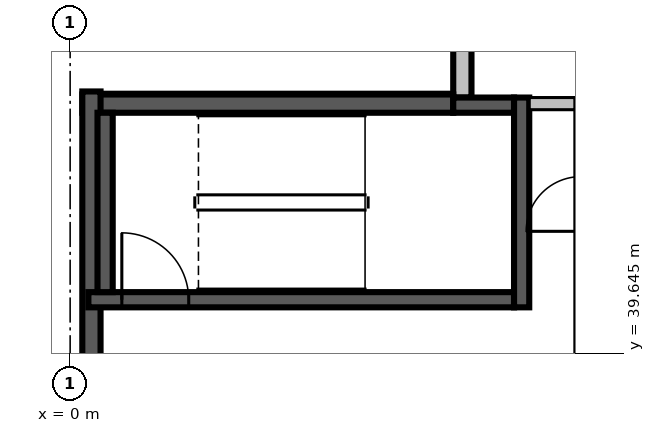
"""IFC4 building model, lengths in metres.
Left out: names, types, materials, properties, quantities, classifications, styles, units other than length and angle.
Written with IfcOpenShell. Run it as: python <this file> out.ifc"""

import sys

from ifc_helpers import new_model, si_unit, direction, frame, frame_2d, origin, place, context, subcontext, project, spatial, rectangle, extrude, source, transform, mapped, element, fill, save


model = new_model("IFC4")
c1 = context("Model", 3, precision=1e-05, world=origin(), true_north=direction((0.0, 1.0)))
c2 = subcontext(c1, "Body", "Model", "MODEL_VIEW")
j1 = project(units=[si_unit("LENGTHUNIT", "METRE"), si_unit("PLANEANGLEUNIT", "RADIAN")], contexts=[c1])
p1 = place(None, origin())
s1 = spatial("IfcSite", under=j1, at=p1, CompositionType="ELEMENT")
p2 = place(p1, origin())
s2 = spatial("IfcBuilding", under=s1, at=p2, CompositionType="ELEMENT")
p3 = place(p2, frame((0.0, 0.0, 153.9)))
s3 = spatial("IfcBuildingStorey", under=s2, at=p3, CompositionType="ELEMENT", Elevation=153.9)
m1 = source(origin(), c2, "Body", "SweptSolid", [
    extrude(rectangle(XDim=9.91, YDim=0.3, at=frame_2d((4.955, 0.0))), origin(), (0.0, 0.0, 1.0), 3.8),
])
p4 = place(p3, frame((6.45, 53.76, 0.0), z_axis=(0.0, 0.0, 1.0), x_axis=(0.0, -1.0, 0.0)))
e1 = element("IfcWall", 1, at=p4, inside=s3, PredefinedType="STANDARD", context=c2, shape_type="MappedRepresentation", body=[
    mapped(m1, transform((0.0, 0.0, 0.0), scale=1.0)),
])
m2 = source(origin(), c2, "Body", "SweptSolid", [
    extrude(rectangle(XDim=3.6, YDim=2.7, at=frame_2d((1.8, 1.35))), frame((0.0, 0.16, 0.0), z_axis=(0.0, -1.0, 0.0), x_axis=(1.0, 0.0, 0.0)), (0.0, 0.0, 1.0), 0.32),
])
p5 = place(p4, frame((3.39, 0.0, 0.6)))
e2 = element("IfcOpeningElement", 2, at=p5, cuts=e1, PredefinedType="OPENING", context=c2, shape_type="MappedRepresentation", body=[
    mapped(m2, transform((0.0, 0.0, 0.0), scale=1.0)),
])
m3 = source(origin(), c2, "Body", "SweptSolid", [
    extrude(rectangle(XDim=2.4, YDim=2.7, at=frame_2d((1.2, 1.35))), frame((0.0, 0.16, 0.0), z_axis=(0.0, -1.0, 0.0), x_axis=(1.0, 0.0, 0.0)), (0.0, 0.0, 1.0), 0.32),
])
p6 = place(p4, frame((0.495, 0.0, 0.6)))
e3 = element("IfcOpeningElement", 3, at=p6, cuts=e1, PredefinedType="OPENING", context=c2, shape_type="MappedRepresentation", body=[
    mapped(m3, transform((0.0, 0.0, 0.0), scale=1.0)),
])
m4 = source(origin(), c2, "Body", "SweptSolid", [
    extrude(rectangle(XDim=6.1, YDim=0.3, at=frame_2d((3.05, 0.0))), origin(), (0.0, 0.0, 1.0), 3.8),
])
p7 = place(p3, frame((6.3, 43.75, 0.0), z_axis=(0.0, 0.0, 1.0), x_axis=(-1.0, 0.0, 0.0)))
e4 = element("IfcWall", 4, at=p7, inside=s3, PredefinedType="SOLIDWALL", context=c2, shape_type="MappedRepresentation", body=[
    mapped(m4, transform((0.0, 0.0, 0.0), scale=1.0)),
])
m5 = source(origin(), c2, "Body", "SweptSolid", [
    extrude(rectangle(XDim=5.65, YDim=0.3, at=frame_2d((2.825, 0.0))), origin(), (0.0, 0.0, 1.0), 3.8),
])
p8 = place(p3, frame((0.35, 43.95, 0.0), z_axis=(0.0, 0.0, 1.0), x_axis=(0.0, -1.0, 0.0)))
e5 = element("IfcWall", 5, at=p8, inside=s3, PredefinedType="SOLIDWALL", context=c2, shape_type="MappedRepresentation", body=[
    mapped(m5, transform((0.0, 0.0, 0.0), scale=1.0)),
])
m6 = source(origin(), c2, "Body", "SweptSolid", [
    extrude(rectangle(XDim=7.0, YDim=0.25, at=frame_2d((3.5, 0.0))), origin(), (0.0, 0.0, 1.0), 3.8),
])
p9 = place(p3, frame((0.3, 40.525, 0.0), z_axis=(0.0, 0.0, 1.0), x_axis=(1.0, 0.0, 0.0)))
e6 = element("IfcWall", 6, at=p9, inside=s3, PredefinedType="SOLIDWALL", context=c2, shape_type="MappedRepresentation", body=[
    mapped(m6, transform((0.0, 0.0, 0.0), scale=1.0)),
])
m7 = source(origin(), c2, "Body", "SweptSolid", [
    extrude(rectangle(XDim=1.1, YDim=2.1, at=frame_2d((0.55, 1.05))), frame((0.0, 0.135, 0.0), z_axis=(0.0, -1.0, 0.0), x_axis=(1.0, 0.0, 0.0)), (0.0, 0.0, 1.0), 0.27),
])
p10 = place(p9, frame((0.55, 0.0, 0.0)))
e7 = element("IfcOpeningElement", 7, at=p10, cuts=e6, PredefinedType="OPENING", context=c2, shape_type="MappedRepresentation", body=[
    mapped(m7, transform((0.0, 0.0, 0.0), scale=1.0)),
])
m8 = source(origin(), c2, "Body", "SweptSolid", [
    extrude(rectangle(XDim=1.0, YDim=0.25, at=frame_2d((0.5, 0.0))), origin(), (0.0, 0.0, 1.0), 3.8),
])
p11 = place(p3, frame((6.3, 43.725, 0.0), z_axis=(0.0, 0.0, 1.0), x_axis=(1.0, 0.0, 0.0)))
e8 = element("IfcWall", 8, at=p11, inside=s3, PredefinedType="SOLIDWALL", context=c2, shape_type="MappedRepresentation", body=[
    mapped(m8, transform((0.0, 0.0, 0.0), scale=1.0)),
])
m9 = source(origin(), c2, "Body", "SweptSolid", [
    extrude(rectangle(XDim=3.45, YDim=0.25, at=frame_2d((1.725, 0.0))), origin(), (0.0, 0.0, 1.0), 3.8),
])
p12 = place(p3, frame((7.425, 40.4, 0.0), z_axis=(0.0, 0.0, 1.0), x_axis=(0.0, 1.0, 0.0)))
e9 = element("IfcWall", 9, at=p12, inside=s3, PredefinedType="SOLIDWALL", context=c2, shape_type="MappedRepresentation", body=[
    mapped(m9, transform((0.0, 0.0, 0.0), scale=1.0)),
])
m10 = source(origin(), c2, "Body", "SweptSolid", [
    extrude(rectangle(XDim=2.95, YDim=0.25, at=frame_2d((1.475, 0.0))), origin(), (0.0, 0.0, 1.0), 3.8),
])
p13 = place(p3, frame((0.575, 40.65, 0.0), z_axis=(0.0, 0.0, 1.0), x_axis=(0.0, 1.0, 0.0)))
e10 = element("IfcWall", 10, at=p13, inside=s3, PredefinedType="SOLIDWALL", context=c2, shape_type="MappedRepresentation", body=[
    mapped(m10, transform((0.0, 0.0, 0.0), scale=1.0)),
])
m11 = source(origin(), c2, "Body", "SweptSolid", [
    extrude(rectangle(XDim=0.75, YDim=0.2, at=frame_2d((0.375, 0.0))), origin(), (0.0, 0.0, 1.0), 3.8),
])
p14 = place(p3, frame((7.55, 43.75, 0.0), z_axis=(0.0, 0.0, 1.0), x_axis=(1.0, 0.0, 0.0)))
e11 = element("IfcWall", 11, at=p14, inside=s3, PredefinedType="PARTITIONING", context=c2, shape_type="MappedRepresentation", body=[
    mapped(m11, transform((0.0, 0.0, 0.0), scale=1.0)),
])
m12 = source(origin(), c2, "Body", "SweptSolid", [
    extrude(rectangle(XDim=1.1, YDim=2.1, at=frame_2d((0.55, 1.05))), frame((0.0, 0.025, 0.0), z_axis=(0.0, -1.0, 0.0), x_axis=(1.0, 0.0, 0.0)), (0.0, 0.0, 1.0), 0.05),
])
p15 = place(p10, origin())
e12 = element("IfcDoor", 12, at=p15, inside=s3, OperationType="SINGLE_SWING_LEFT", PredefinedType="DOOR", context=c2, shape_type="MappedRepresentation", body=[
    mapped(m12, transform((0.0, 0.0, 0.0), scale=1.0)),
])
fill(e7, e12)
save(model, sys.argv[1])
